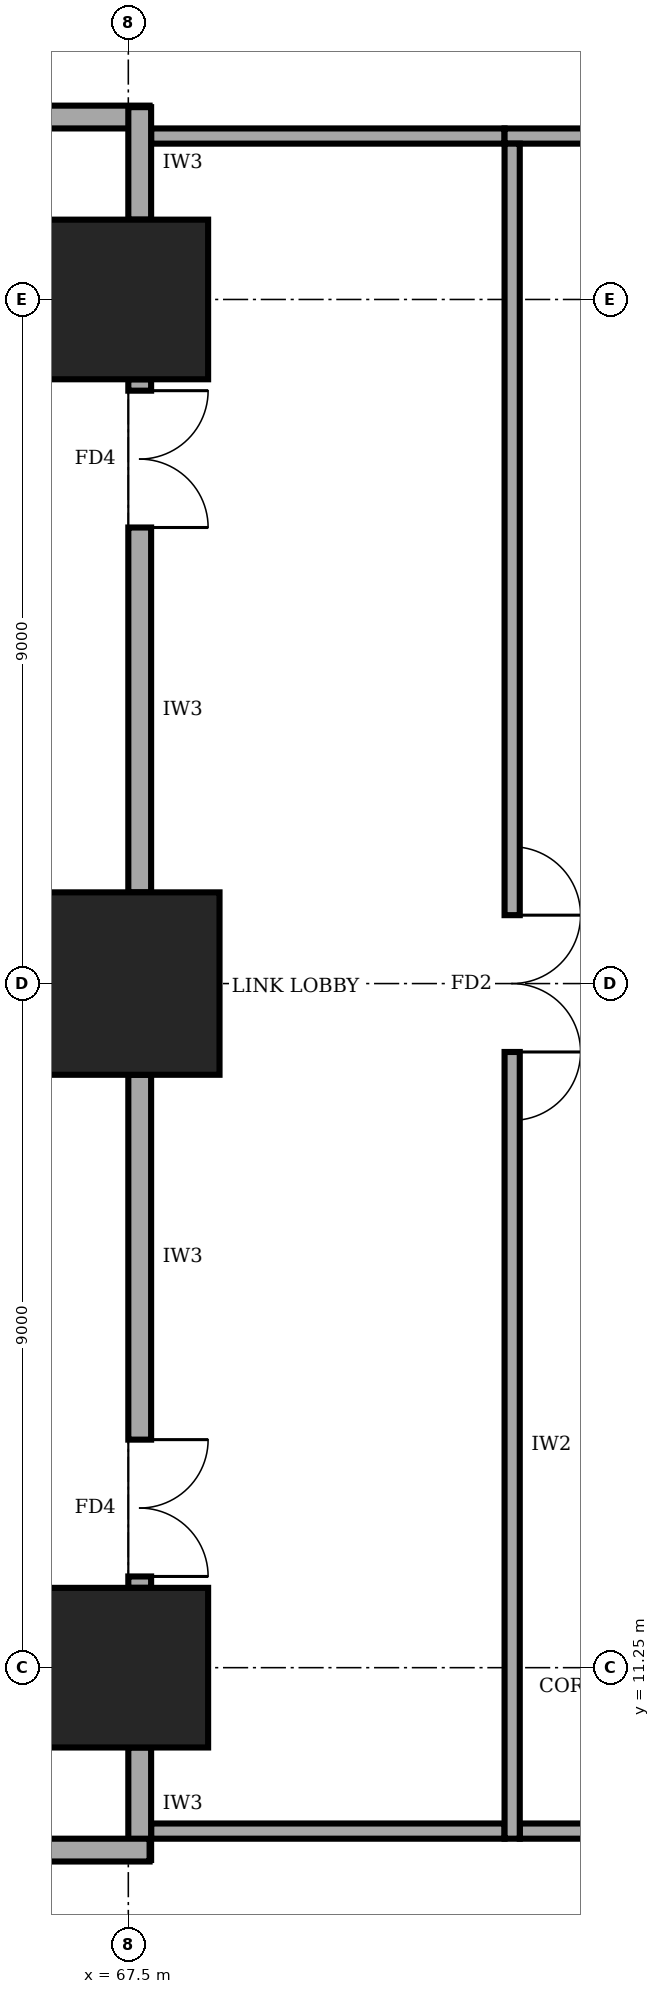
"""IFC4 building model, lengths in metres.
Left out: names, types, materials, properties, quantities, classifications, styles, units other than length and angle.
Written with IfcOpenShell. Run it as: python <this file> out.ifc"""

import sys

from ifc_helpers import new_model, si_unit, direction, frame, frame_2d, origin, origin_2d, place, context, subcontext, project, spatial, rectangle, extrude, element, fill, save


model = new_model("IFC4")
c1 = context("Model", 3, precision=1e-05, world=origin(), true_north=direction((0.0, 1.0)))
c2 = subcontext(c1, "Body", "Model", "MODEL_VIEW")
j1 = project(units=[si_unit("LENGTHUNIT", "METRE"), si_unit("PLANEANGLEUNIT", "RADIAN")], contexts=[c1])
p1 = place(None, origin())
s1 = spatial("IfcSite", under=j1, at=p1, CompositionType="ELEMENT")
p2 = place(p1, origin())
s2 = spatial("IfcBuilding", under=s1, at=p2, CompositionType="ELEMENT")
p3 = place(p2, frame((0.0, 0.0, 133.0)))
s3 = spatial("IfcBuildingStorey", under=s2, at=p3, CompositionType="ELEMENT", Elevation=133.0)
p4 = place(p3, frame((67.5, 11.25, 0.0), z_axis=(0.0, 0.0, 1.0), x_axis=(1.0, 0.0, 0.0)))
e1 = element("IfcColumn", 1, at=p4, inside=s3, PredefinedType="COLUMN", context=c2, shape_type="SweptSolid", body=[
    extrude(rectangle(XDim=2.1, YDim=2.1, at=origin_2d()), origin(), (0.0, 0.0, 1.0), 4.0),
])
p5 = place(p3, frame((67.5, 20.25, 0.0), z_axis=(0.0, 0.0, 1.0), x_axis=(1.0, 0.0, 0.0)))
e2 = element("IfcColumn", 2, at=p5, inside=s3, PredefinedType="COLUMN", context=c2, shape_type="SweptSolid", body=[
    extrude(rectangle(XDim=2.4, YDim=2.4, at=origin_2d()), origin(), (0.0, 0.0, 1.0), 4.0),
])
p6 = place(p3, frame((67.5, 29.25, 0.0), z_axis=(0.0, 0.0, 1.0), x_axis=(1.0, 0.0, 0.0)))
e3 = element("IfcColumn", 3, at=p6, inside=s3, PredefinedType="COLUMN", context=c2, shape_type="SweptSolid", body=[
    extrude(rectangle(XDim=2.1, YDim=2.1, at=origin_2d()), origin(), (0.0, 0.0, 1.0), 4.0),
])
p7 = place(p3, frame((63.02, 31.65, 0.0), z_axis=(0.0, 0.0, 1.0), x_axis=(1.0, 0.0, 0.0)))
e4 = element("IfcWall", 4, at=p7, inside=s3, PredefinedType="SOLIDWALL", context=c2, shape_type="SweptSolid", body=[
    extrude(rectangle(XDim=4.76, YDim=0.3, at=frame_2d((2.38, 0.0))), origin(), (0.0, 0.0, 1.0), 3.75),
])
p8 = place(p3, frame((67.65, 31.78, 0.0), z_axis=(0.0, 0.0, 1.0), x_axis=(0.0, -1.0, 0.0)))
e5 = element("IfcWall", 5, at=p8, inside=s3, PredefinedType="SOLIDWALL", context=c2, shape_type="SweptSolid", body=[
    extrude(rectangle(XDim=1.48, YDim=0.3, at=frame_2d((0.74, 0.0))), origin(), (0.0, 0.0, 1.0), 2.65),
])
p9 = place(p3, frame((67.65, 28.2, 0.0), z_axis=(0.0, 0.0, 1.0), x_axis=(0.0, -1.0, 0.0)))
e6 = element("IfcWall", 6, at=p9, inside=s3, PredefinedType="SOLIDWALL", context=c2, shape_type="SweptSolid", body=[
    extrude(rectangle(XDim=6.75, YDim=0.3, at=frame_2d((3.375, 0.0))), origin(), (0.0, 0.0, 1.0), 2.65),
])
p10 = place(p9, frame((0.15, 0.0, 0.0)))
e7 = element("IfcOpeningElement", 7, at=p10, cuts=e6, PredefinedType="OPENING", context=c2, shape_type="SweptSolid", body=[
    extrude(rectangle(XDim=1.8, YDim=2.1, at=frame_2d((0.9, 1.05))), frame((0.0, 0.16, 0.0), z_axis=(0.0, -1.0, 0.0), x_axis=(1.0, 0.0, 0.0)), (0.0, 0.0, 1.0), 0.32),
])
p11 = place(p3, frame((67.65, 19.05, 0.0), z_axis=(0.0, 0.0, 1.0), x_axis=(0.0, -1.0, 0.0)))
e8 = element("IfcWall", 8, at=p11, inside=s3, PredefinedType="SOLIDWALL", context=c2, shape_type="SweptSolid", body=[
    extrude(rectangle(XDim=6.75, YDim=0.3, at=frame_2d((3.375, 0.0))), origin(), (0.0, 0.0, 1.0), 2.65),
])
p12 = place(p11, frame((4.8, 0.0, 0.0)))
e9 = element("IfcOpeningElement", 9, at=p12, cuts=e8, PredefinedType="OPENING", context=c2, shape_type="SweptSolid", body=[
    extrude(rectangle(XDim=1.8, YDim=2.1, at=frame_2d((0.9, 1.05))), frame((0.0, 0.16, 0.0), z_axis=(0.0, -1.0, 0.0), x_axis=(1.0, 0.0, 0.0)), (0.0, 0.0, 1.0), 0.32),
])
p13 = place(p3, frame((67.65, 10.2, 0.0), z_axis=(0.0, 0.0, 1.0), x_axis=(0.0, -1.0, 0.0)))
e10 = element("IfcWall", 10, at=p13, inside=s3, PredefinedType="SOLIDWALL", context=c2, shape_type="SweptSolid", body=[
    extrude(rectangle(XDim=1.48, YDim=0.3, at=frame_2d((0.74, 0.0))), origin(), (0.0, 0.0, 1.0), 2.65),
])
p14 = place(p3, frame((67.78, 8.85, 0.0), z_axis=(0.0, 0.0, 1.0), x_axis=(-1.0, 0.0, 0.0)))
e11 = element("IfcWall", 11, at=p14, inside=s3, PredefinedType="SOLIDWALL", context=c2, shape_type="SweptSolid", body=[
    extrude(rectangle(XDim=4.76, YDim=0.3, at=frame_2d((2.38, 0.0))), origin(), (0.0, 0.0, 1.0), 3.75),
])
p15 = place(p3, frame((72.65, 9.1, 0.0), z_axis=(0.0, 0.0, 1.0), x_axis=(1.0, 0.0, 0.0)))
e12 = element("IfcWall", 12, at=p15, inside=s3, PredefinedType="SOLIDWALL", context=c2, shape_type="SweptSolid", body=[
    extrude(rectangle(XDim=16.9, YDim=0.2, at=frame_2d((8.45, 0.0))), origin(), (0.0, 0.0, 1.0), 3.75),
])
p16 = place(p15, frame((1.325, 0.0, 0.0)))
e13 = element("IfcOpeningElement", 13, at=p16, cuts=e12, PredefinedType="OPENING", context=c2, shape_type="SweptSolid", body=[
    extrude(rectangle(XDim=1.0, YDim=2.1, at=frame_2d((0.5, 1.05))), frame((0.0, 0.11, 0.0), z_axis=(0.0, -1.0, 0.0), x_axis=(1.0, 0.0, 0.0)), (0.0, 0.0, 1.0), 0.22),
])
p17 = place(p15, frame((5.6, 0.0, 0.0)))
e14 = element("IfcOpeningElement", 14, at=p17, cuts=e12, PredefinedType="OPENING", context=c2, shape_type="SweptSolid", body=[
    extrude(rectangle(XDim=1.0, YDim=2.1, at=frame_2d((0.5, 1.05))), frame((0.0, 0.11, 0.0), z_axis=(0.0, -1.0, 0.0), x_axis=(1.0, 0.0, 0.0)), (0.0, 0.0, 1.0), 0.22),
])
p18 = place(p15, frame((12.125, 0.0, 0.0)))
e15 = element("IfcOpeningElement", 15, at=p18, cuts=e12, PredefinedType="OPENING", context=c2, shape_type="SweptSolid", body=[
    extrude(rectangle(XDim=1.0, YDim=2.1, at=frame_2d((0.5, 1.05))), frame((0.0, 0.11, 0.0), z_axis=(0.0, -1.0, 0.0), x_axis=(1.0, 0.0, 0.0)), (0.0, 0.0, 1.0), 0.22),
])
p19 = place(p3, frame((89.35, 31.4, 0.0), z_axis=(0.0, 0.0, 1.0), x_axis=(-1.0, 0.0, 0.0)))
e16 = element("IfcWall", 16, at=p19, inside=s3, PredefinedType="SOLIDWALL", context=c2, shape_type="SweptSolid", body=[
    extrude(rectangle(XDim=16.9, YDim=0.2, at=frame_2d((8.45, 0.0))), origin(), (0.0, 0.0, 1.0), 3.75),
])
p20 = place(p19, frame((13.975, 0.0, 0.0)))
e17 = element("IfcOpeningElement", 17, at=p20, cuts=e16, PredefinedType="OPENING", context=c2, shape_type="SweptSolid", body=[
    extrude(rectangle(XDim=1.8, YDim=2.1, at=frame_2d((0.9, 1.05))), frame((0.0, 0.11, 0.0), z_axis=(0.0, -1.0, 0.0), x_axis=(1.0, 0.0, 0.0)), (0.0, 0.0, 1.0), 0.22),
])
p21 = place(p19, frame((7.85, 0.0, 0.0)))
e18 = element("IfcOpeningElement", 18, at=p21, cuts=e16, PredefinedType="OPENING", context=c2, shape_type="SweptSolid", body=[
    extrude(rectangle(XDim=1.0, YDim=2.1, at=frame_2d((0.5, 1.05))), frame((0.0, 0.11, 0.0), z_axis=(0.0, -1.0, 0.0), x_axis=(1.0, 0.0, 0.0)), (0.0, 0.0, 1.0), 0.22),
])
p22 = place(p19, frame((1.325, 0.0, 0.0)))
e19 = element("IfcOpeningElement", 19, at=p22, cuts=e16, PredefinedType="OPENING", context=c2, shape_type="SweptSolid", body=[
    extrude(rectangle(XDim=1.0, YDim=2.1, at=frame_2d((0.5, 1.05))), frame((0.0, 0.11, 0.0), z_axis=(0.0, -1.0, 0.0), x_axis=(1.0, 0.0, 0.0)), (0.0, 0.0, 1.0), 0.22),
])
p23 = place(p3, frame((72.55, 31.3, 0.0), z_axis=(0.0, 0.0, 1.0), x_axis=(0.0, -1.0, 0.0)))
e20 = element("IfcWall", 20, at=p23, inside=s3, PredefinedType="SOLIDWALL", context=c2, shape_type="SweptSolid", body=[
    extrude(rectangle(XDim=22.3, YDim=0.2, at=frame_2d((11.15, 0.0))), origin(), (0.0, 0.0, 1.0), 3.75),
])
p24 = place(p23, frame((10.15, 0.0, 0.0)))
e21 = element("IfcOpeningElement", 21, at=p24, cuts=e20, PredefinedType="OPENING", context=c2, shape_type="SweptSolid", body=[
    extrude(rectangle(XDim=1.8, YDim=2.1, at=frame_2d((0.9, 1.05))), frame((0.0, 0.11, 0.0), z_axis=(0.0, -1.0, 0.0), x_axis=(1.0, 0.0, 0.0)), (0.0, 0.0, 1.0), 0.22),
])
for number, where, z_axis, x_axis in (
    (22, (67.8, 9.1, 0.0), (0.0, 0.0, 1.0), (1.0, 0.0, 0.0)),
    (23, (67.8, 31.4, 0.0), (0.0, 0.0, 1.0), (1.0, 0.0, 0.0)),
):
    element("IfcWall", number, at=place(p3, frame(where, z_axis=z_axis, x_axis=x_axis)), inside=s3, PredefinedType="SOLIDWALL", context=c2, shape_type="SweptSolid", body=[
        extrude(rectangle(XDim=4.65, YDim=0.2, at=frame_2d((2.325, 0.0))), origin(), (0.0, 0.0, 1.0), 3.75),
    ])
for number, where, z_axis, x_axis in (
    (24, (63.5, 15.1, 0.0), (0.0, 0.0, 1.0), (1.0, 0.0, 0.0)),
    (25, (63.5, 25.4, 0.0), (0.0, 0.0, 1.0), (1.0, 0.0, 0.0)),
):
    element("IfcWall", number, at=place(p3, frame(where, z_axis=z_axis, x_axis=x_axis)), inside=s3, PredefinedType="SOLIDWALL", context=c2, shape_type="SweptSolid", body=[
        extrude(rectangle(XDim=4.0, YDim=0.2, at=frame_2d((2.0, 0.0))), origin(), (0.0, 0.0, 1.0), 3.75),
    ])
p25 = place(p24, origin())
e26 = element("IfcDoor", 26, at=p25, inside=s3, OperationType="DOUBLE_DOOR_SINGLE_SWING", PredefinedType="DOOR", context=c2, shape_type="SweptSolid", body=[
    extrude(rectangle(XDim=1.8, YDim=2.1, at=frame_2d((0.9, 1.05))), frame((0.0, 0.025, 0.0), z_axis=(0.0, -1.0, 0.0), x_axis=(1.0, 0.0, 0.0)), (0.0, 0.0, 1.0), 0.05),
])
fill(e21, e26)
p26 = place(p10, origin())
e27 = element("IfcDoor", 27, at=p26, inside=s3, OperationType="DOUBLE_DOOR_SINGLE_SWING", PredefinedType="DOOR", context=c2, shape_type="SweptSolid", body=[
    extrude(rectangle(XDim=1.8, YDim=2.1, at=frame_2d((0.9, 1.05))), frame((0.0, 0.025, 0.0), z_axis=(0.0, -1.0, 0.0), x_axis=(1.0, 0.0, 0.0)), (0.0, 0.0, 1.0), 0.05),
])
fill(e7, e27)
p27 = place(p12, origin())
e28 = element("IfcDoor", 28, at=p27, inside=s3, OperationType="DOUBLE_DOOR_SINGLE_SWING", PredefinedType="DOOR", context=c2, shape_type="SweptSolid", body=[
    extrude(rectangle(XDim=1.8, YDim=2.1, at=frame_2d((0.9, 1.05))), frame((0.0, 0.025, 0.0), z_axis=(0.0, -1.0, 0.0), x_axis=(1.0, 0.0, 0.0)), (0.0, 0.0, 1.0), 0.05),
])
fill(e9, e28)
save(model, sys.argv[1])
